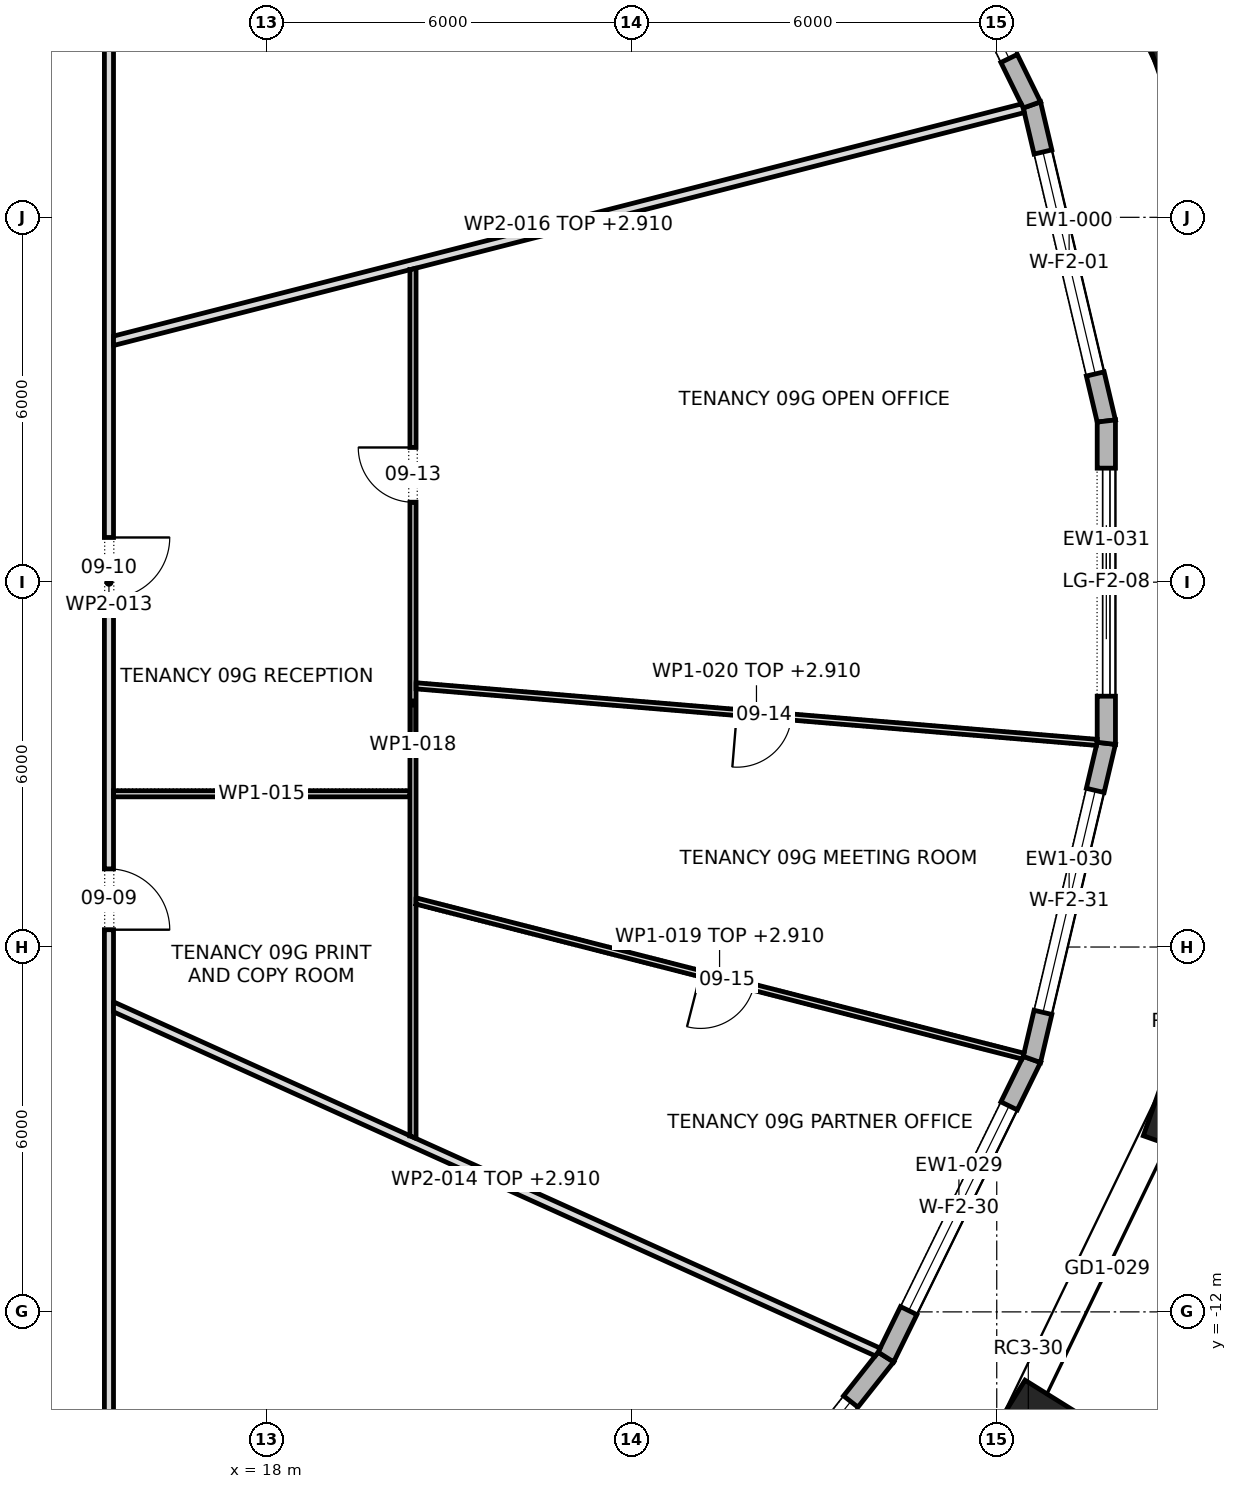
"""IFC4 building model, lengths in metres.
Left out: names, types, materials, properties, quantities, classifications, styles, units other than length and angle.
Written with IfcOpenShell. Run it as: python <this file> out.ifc"""

import sys

from ifc_helpers import new_model, si_unit, direction, frame, frame_2d, origin, origin_2d, place, context, subcontext, project, spatial, polyline, rectangle, outline, extrude, element, fill, save


model = new_model("IFC4")
c1 = context("Model", 3, precision=1e-05, world=origin(), true_north=direction((0.0, 1.0)))
c2 = subcontext(c1, "Body", "Model", "MODEL_VIEW")
j1 = project(units=[si_unit("LENGTHUNIT", "METRE"), si_unit("PLANEANGLEUNIT", "RADIAN")], contexts=[c1])
p1 = place(None, origin())
s1 = spatial("IfcSite", under=j1, at=p1, CompositionType="ELEMENT")
p2 = place(p1, origin())
s2 = spatial("IfcBuilding", under=s1, at=p2, CompositionType="ELEMENT")
p3 = place(p2, frame((0.0, 0.0, 129.7)))
s3 = spatial("IfcBuildingStorey", under=s2, at=p3, CompositionType="ELEMENT", Elevation=129.7)
for number, where, z_axis, x_axis in (
    (1, (33.115, 8.61, 0.0), (0.0, 0.0, 1.0), (-0.334, 0.943, 0.0)),
    (2, (30.519, -13.982, 0.0), (0.0, 0.0, 1.0), (0.529, 0.849, 0.0)),
    (3, (33.115, -8.61, 0.0), (0.0, 0.0, 1.0), (0.334, 0.943, 0.0)),
):
    element("IfcColumn", number, at=place(p3, frame(where, z_axis=z_axis, x_axis=x_axis)), inside=s3, PredefinedType="COLUMN", context=c2, shape_type="SweptSolid", body=[
        extrude(rectangle(XDim=1.4, YDim=1.0, at=origin_2d()), origin(), (0.0, 0.0, 1.0), 4.2),
    ])
p4 = place(p3, frame((31.802, 2.65, 0.0), z_axis=(0.0, 0.0, 1.0), x_axis=(-0.229227895667, 0.973372781543, 0.0)))
e4 = element("IfcWall", 4, at=p4, inside=s3, PredefinedType="STANDARD", context=c2, shape_type="SweptSolid", body=[
    extrude(outline(polyline([(-0.017, -0.15), (5.357, -0.15), (5.323, 0.15), (0.017, 0.15), (-0.017, -0.15)])), origin(), (0.0, 0.0, 1.0), 3.9),
])
p5 = place(p4, frame((0.795, 0.0, 0.6)))
e5 = element("IfcOpeningElement", 5, at=p5, cuts=e4, PredefinedType="OPENING", context=c2, shape_type="SweptSolid", body=[
    extrude(rectangle(XDim=3.75, YDim=2.85, at=frame_2d((1.875, 1.425))), frame((0.0, 0.162, 0.0), z_axis=(0.0, -1.0, 0.0), x_axis=(1.0, 0.0, 0.0)), (0.0, 0.0, 1.0), 0.324),
])
p6 = place(p3, frame((30.578, 7.848, 0.0), z_axis=(0.0, 0.0, 1.0), x_axis=(-0.440321465864, 0.897840189956, 0.0)))
e6 = element("IfcWall", 6, at=p6, inside=s3, PredefinedType="STANDARD", context=c2, shape_type="SweptSolid", body=[
    extrude(outline(polyline([(-0.017, -0.15), (5.468, -0.15), (5.435, 0.15), (0.017, 0.15), (-0.017, -0.15)])), origin(), (0.0, 0.0, 1.0), 3.9),
])
p7 = place(p6, frame((0.851, 0.0, 0.6)))
e7 = element("IfcOpeningElement", 7, at=p7, cuts=e6, PredefinedType="OPENING", context=c2, shape_type="SweptSolid", body=[
    extrude(rectangle(XDim=3.75, YDim=2.85, at=frame_2d((1.875, 1.425))), frame((0.0, 0.162, 0.0), z_axis=(0.0, -1.0, 0.0), x_axis=(1.0, 0.0, 0.0)), (0.0, 0.0, 1.0), 0.324),
])
p8 = place(p3, frame((24.694, -17.146, 0.0), z_axis=(0.0, 0.0, 1.0), x_axis=(0.620464552431, 0.784234492468, 0.0)))
e8 = element("IfcWall", 8, at=p8, inside=s3, PredefinedType="STANDARD", context=c2, shape_type="SweptSolid", body=[
    extrude(outline(polyline([(-0.015, -0.15), (5.63, -0.15), (5.598, 0.15), (0.015, 0.15), (-0.015, -0.15)])), origin(), (0.0, 0.0, 1.0), 3.9),
])
p9 = place(p8, frame((0.932, 0.0, 0.6)))
e9 = element("IfcOpeningElement", 9, at=p9, cuts=e8, PredefinedType="OPENING", context=c2, shape_type="SweptSolid", body=[
    extrude(rectangle(XDim=3.75, YDim=2.85, at=frame_2d((1.875, 1.425))), frame((0.0, 0.162, 0.0), z_axis=(0.0, -1.0, 0.0), x_axis=(1.0, 0.0, 0.0)), (0.0, 0.0, 1.0), 0.324),
])
p10 = place(p3, frame((28.177, -12.743, 0.0), z_axis=(0.0, 0.0, 1.0), x_axis=(0.440321465864, 0.897840189956, 0.0)))
e10 = element("IfcWall", 10, at=p10, inside=s3, PredefinedType="STANDARD", context=c2, shape_type="SweptSolid", body=[
    extrude(outline(polyline([(-0.016, -0.15), (5.468, -0.15), (5.435, 0.15), (0.016, 0.15), (-0.016, -0.15)])), origin(), (0.0, 0.0, 1.0), 3.9),
])
p11 = place(p10, frame((0.851, 0.0, 0.6)))
e11 = element("IfcOpeningElement", 11, at=p11, cuts=e10, PredefinedType="OPENING", context=c2, shape_type="SweptSolid", body=[
    extrude(rectangle(XDim=3.75, YDim=2.85, at=frame_2d((1.875, 1.425))), frame((0.0, 0.162, 0.0), z_axis=(0.0, -1.0, 0.0), x_axis=(1.0, 0.0, 0.0)), (0.0, 0.0, 1.0), 0.324),
])
p12 = place(p3, frame((30.578, -7.848, 0.0), z_axis=(0.0, 0.0, 1.0), x_axis=(0.229227895667, 0.973372781543, 0.0)))
e12 = element("IfcWall", 12, at=p12, inside=s3, PredefinedType="STANDARD", context=c2, shape_type="SweptSolid", body=[
    extrude(outline(polyline([(-0.017, -0.15), (5.357, -0.15), (5.323, 0.15), (0.017, 0.15), (-0.017, -0.15)])), origin(), (0.0, 0.0, 1.0), 3.9),
])
p13 = place(p12, frame((0.795, 0.0, 0.6)))
e13 = element("IfcOpeningElement", 13, at=p13, cuts=e12, PredefinedType="OPENING", context=c2, shape_type="SweptSolid", body=[
    extrude(rectangle(XDim=3.75, YDim=2.85, at=frame_2d((1.875, 1.425))), frame((0.0, 0.162, 0.0), z_axis=(0.0, -1.0, 0.0), x_axis=(1.0, 0.0, 0.0)), (0.0, 0.0, 1.0), 0.324),
])
p14 = place(p3, frame((31.802, -2.65, 0.0), z_axis=(0.0, 0.0, 1.0), x_axis=(0.0, 1.0, 0.0)))
e14 = element("IfcWall", 14, at=p14, inside=s3, PredefinedType="STANDARD", context=c2, shape_type="SweptSolid", body=[
    extrude(outline(polyline([(-0.017, -0.15), (5.318, -0.15), (5.283, 0.15), (0.017, 0.15), (-0.017, -0.15)])), origin(), (0.0, 0.0, 1.0), 3.9),
])
p15 = place(p14, frame((0.775, 0.0, 0.0)))
e15 = element("IfcOpeningElement", 15, at=p15, cuts=e14, PredefinedType="OPENING", context=c2, shape_type="SweptSolid", body=[
    extrude(rectangle(XDim=3.75, YDim=3.45, at=frame_2d((1.875, 1.725))), frame((0.0, 0.162, 0.0), z_axis=(0.0, -1.0, 0.0), x_axis=(1.0, 0.0, 0.0)), (0.0, 0.0, 1.0), 0.324),
])
p16 = place(p3, frame((15.4, -15.475, 0.0), z_axis=(0.0, 0.0, 1.0), x_axis=(0.0, 1.0, 0.0)))
e16 = element("IfcWall", 16, at=p16, inside=s3, PredefinedType="PARTITIONING", context=c2, shape_type="SweptSolid", body=[
    extrude(outline(polyline([(0.0, -0.075), (1.935, -0.075), (3.869, -0.075), (5.803, -0.075), (7.738, -0.075), (9.672, -0.075), (11.606, -0.075), (13.541, -0.075), (15.475, -0.075), (17.409, -0.075), (19.344, -0.075), (21.278, -0.075), (23.212, -0.075), (25.147, -0.075), (27.081, -0.075), (29.016, -0.075), (30.95, -0.075), (30.8, 0.075), (28.885, 0.075), (26.969, 0.075), (25.053, 0.075), (23.138, 0.075), (21.222, 0.075), (19.306, 0.075), (17.391, 0.075), (15.475, 0.075), (13.56, 0.075), (11.644, 0.075), (9.728, 0.075), (7.812, 0.075), (5.897, 0.075), (3.981, 0.075), (2.066, 0.075), (0.15, 0.075), (0.0, -0.075)])), origin(), (0.0, 0.0, 1.0), 3.9),
])
p17 = place(p16, frame((9.76, 0.0, 0.0)))
e17 = element("IfcOpeningElement", 17, at=p17, cuts=e16, PredefinedType="OPENING", context=c2, shape_type="SweptSolid", body=[
    extrude(rectangle(XDim=1.0, YDim=2.1, at=frame_2d((0.5, 1.05))), frame((0.0, 0.087, 0.0), z_axis=(0.0, -1.0, 0.0), x_axis=(1.0, 0.0, 0.0)), (0.0, 0.0, 1.0), 0.174),
])
p18 = place(p16, frame((15.21, 0.0, 0.0)))
e18 = element("IfcOpeningElement", 18, at=p18, cuts=e16, PredefinedType="OPENING", context=c2, shape_type="SweptSolid", body=[
    extrude(rectangle(XDim=1.0, YDim=2.1, at=frame_2d((0.5, 1.05))), frame((0.0, 0.087, 0.0), z_axis=(0.0, -1.0, 0.0), x_axis=(1.0, 0.0, 0.0)), (0.0, 0.0, 1.0), 0.174),
])
p19 = place(p16, frame((24.25, 0.0, 0.0)))
e19 = element("IfcOpeningElement", 19, at=p19, cuts=e16, PredefinedType="OPENING", context=c2, shape_type="SweptSolid", body=[
    extrude(rectangle(XDim=1.8, YDim=2.1, at=frame_2d((0.9, 1.05))), frame((0.0, 0.087, 0.0), z_axis=(0.0, -1.0, 0.0), x_axis=(1.0, 0.0, 0.0)), (0.0, 0.0, 1.0), 0.174),
])
p20 = place(p3, frame((15.444, -6.97, 0.0), z_axis=(0.0, 0.0, 1.0), x_axis=(0.911352660786, -0.411626441909, 0.0)))
e20 = element("IfcWall", 20, at=p20, inside=s3, PredefinedType="PARTITIONING", context=c2, shape_type="SweptSolid", body=[
    extrude(outline(polyline([(0.068, -0.075), (2.031, -0.075), (3.995, -0.075), (5.958, -0.075), (7.922, -0.075), (9.885, -0.075), (11.849, -0.075), (13.812, -0.075), (13.832, 0.001), (13.834, 0.074), (13.834, 0.075), (12.137, 0.075), (10.441, 0.075), (8.745, 0.075), (7.049, 0.075), (5.353, 0.075), (5.35, 0.074), (5.349, 0.075), (3.566, 0.075), (1.783, 0.075), (0.0, 0.075), (0.068, -0.075)])), origin(), (0.0, 0.0, 1.0), 2.91),
])
p21 = place(p3, frame((15.475, -3.48, 0.0), z_axis=(0.0, 0.0, 1.0), x_axis=(1.0, 0.0, 0.0)))
e21 = element("IfcWall", 21, at=p21, inside=s3, PredefinedType="PARTITIONING", context=c2, shape_type="SweptSolid", body=[
    extrude(rectangle(XDim=4.875, YDim=0.1, at=frame_2d((2.438, 0.0))), origin(), (0.0, 0.0, 1.0), 3.9),
])
p22 = place(p3, frame((15.457, 3.965, 0.0), z_axis=(0.0, 0.0, 1.0), x_axis=(0.968826155352, 0.247741560312, 0.0)))
e22 = element("IfcWall", 22, at=p22, inside=s3, PredefinedType="PARTITIONING", context=c2, shape_type="SweptSolid", body=[
    extrude(outline(polyline([(0.0, -0.075), (1.677, -0.075), (3.354, -0.075), (5.031, -0.075), (5.032, -0.073), (5.038, -0.075), (6.775, -0.075), (8.512, -0.075), (10.249, -0.075), (11.986, -0.075), (13.723, -0.075), (15.46, -0.075), (15.46, 0.01), (15.447, 0.075), (13.521, 0.075), (11.594, 0.075), (9.668, 0.075), (7.742, 0.075), (5.816, 0.075), (3.89, 0.075), (1.964, 0.075), (0.038, 0.075), (0.0, -0.073), (0.0, -0.075)])), origin(), (0.0, 0.0, 1.0), 2.91),
])
p23 = place(p3, frame((20.4, -9.148, 0.0), z_axis=(0.0, 0.0, 1.0), x_axis=(0.0, 1.0, 0.0)))
e23 = element("IfcWall", 23, at=p23, inside=s3, PredefinedType="PARTITIONING", context=c2, shape_type="SweptSolid", body=[
    extrude(outline(polyline([(0.0, -0.05), (1.927, -0.05), (3.854, -0.05), (3.854, -0.048), (3.861, -0.05), (5.603, -0.05), (7.345, -0.05), (9.087, -0.05), (10.828, -0.05), (12.57, -0.05), (14.312, -0.05), (14.312, -0.049), (14.287, 0.05), (12.573, 0.05), (10.859, 0.05), (9.146, 0.05), (7.432, 0.05), (5.719, 0.05), (5.719, 0.05), (5.618, 0.05), (5.618, 0.05), (3.761, 0.05), (1.903, 0.05), (0.045, 0.05), (0.0, -0.05), (0.0, -0.05)])), origin(), (0.0, 0.0, 1.0), 3.9),
])
p24 = place(p23, frame((10.463, 0.0, 0.0)))
e24 = element("IfcOpeningElement", 24, at=p24, cuts=e23, PredefinedType="OPENING", context=c2, shape_type="SweptSolid", body=[
    extrude(rectangle(XDim=0.9, YDim=2.1, at=frame_2d((0.45, 1.05))), frame((0.0, 0.062, 0.0), z_axis=(0.0, -1.0, 0.0), x_axis=(1.0, 0.0, 0.0)), (0.0, 0.0, 1.0), 0.124),
])
p25 = place(p3, frame((20.438, -5.24, 0.0), z_axis=(0.0, 0.0, 1.0), x_axis=(0.968862785912, -0.247598267511, 0.0)))
e25 = element("IfcWall", 25, at=p25, inside=s3, PredefinedType="PARTITIONING", context=c2, shape_type="SweptSolid", body=[
    extrude(outline(polyline([(0.025, -0.05), (1.74, -0.05), (3.454, -0.05), (5.168, -0.05), (6.882, -0.05), (8.596, -0.05), (10.31, -0.05), (10.319, -0.008), (10.319, 0.05), (8.599, 0.05), (6.879, 0.05), (5.159, 0.05), (3.44, 0.05), (1.72, 0.05), (0.0, 0.05), (0.0, 0.05), (0.025, -0.05)])), origin(), (0.0, 0.0, 1.0), 2.91),
])
p26 = place(p25, frame((4.842, 0.0, 0.0)))
e26 = element("IfcOpeningElement", 26, at=p26, cuts=e25, PredefinedType="OPENING", context=c2, shape_type="SweptSolid", body=[
    extrude(rectangle(XDim=0.9, YDim=2.1, at=frame_2d((0.45, 1.05))), frame((0.0, 0.062, 0.0), z_axis=(0.0, -1.0, 0.0), x_axis=(1.0, 0.0, 0.0)), (0.0, 0.0, 1.0), 0.124),
])
p27 = place(p3, frame((20.446, -1.704, 0.0), z_axis=(0.0, 0.0, 1.0), x_axis=(0.996562664629, -0.082842353107, 0.0)))
e27 = element("IfcWall", 27, at=p27, inside=s3, PredefinedType="PARTITIONING", context=c2, shape_type="SweptSolid", body=[
    extrude(outline(polyline([(0.008, -0.05), (1.879, -0.05), (3.751, -0.05), (5.622, -0.05), (7.494, -0.05), (9.365, -0.05), (11.236, -0.05), (11.24, -0.026), (11.24, 0.05), (9.367, 0.05), (7.493, 0.05), (5.62, 0.05), (3.747, 0.05), (1.873, 0.05), (0.0, 0.05), (0.0, 0.045), (0.008, -0.05)])), origin(), (0.0, 0.0, 1.0), 2.91),
])
p28 = place(p27, frame((5.298, 0.0, 0.0)))
e28 = element("IfcOpeningElement", 28, at=p28, cuts=e27, PredefinedType="OPENING", context=c2, shape_type="SweptSolid", body=[
    extrude(rectangle(XDim=0.9, YDim=2.1, at=frame_2d((0.45, 1.05))), frame((0.0, 0.062, 0.0), z_axis=(0.0, -1.0, 0.0), x_axis=(1.0, 0.0, 0.0)), (0.0, 0.0, 1.0), 0.124),
])
p29 = place(p5, origin())
e29 = element("IfcWindow", 29, at=p29, inside=s3, PartitioningType="TRIPLE_PANEL_VERTICAL", PredefinedType="WINDOW", context=c2, shape_type="SweptSolid", body=[
    extrude(rectangle(XDim=3.75, YDim=2.85, at=frame_2d((1.875, 1.425))), frame((0.0, 0.03, 0.0), z_axis=(0.0, -1.0, 0.0), x_axis=(1.0, 0.0, 0.0)), (0.0, 0.0, 1.0), 0.06),
])
fill(e5, e29)
p30 = place(p7, origin())
e30 = element("IfcWindow", 30, at=p30, inside=s3, PartitioningType="TRIPLE_PANEL_VERTICAL", PredefinedType="WINDOW", context=c2, shape_type="SweptSolid", body=[
    extrude(rectangle(XDim=3.75, YDim=2.85, at=frame_2d((1.875, 1.425))), frame((0.0, 0.03, 0.0), z_axis=(0.0, -1.0, 0.0), x_axis=(1.0, 0.0, 0.0)), (0.0, 0.0, 1.0), 0.06),
])
fill(e7, e30)
p31 = place(p9, origin())
e31 = element("IfcWindow", 31, at=p31, inside=s3, PartitioningType="TRIPLE_PANEL_VERTICAL", PredefinedType="WINDOW", context=c2, shape_type="SweptSolid", body=[
    extrude(rectangle(XDim=3.75, YDim=2.85, at=frame_2d((1.875, 1.425))), frame((0.0, 0.03, 0.0), z_axis=(0.0, -1.0, 0.0), x_axis=(1.0, 0.0, 0.0)), (0.0, 0.0, 1.0), 0.06),
])
fill(e9, e31)
p32 = place(p11, origin())
e32 = element("IfcWindow", 32, at=p32, inside=s3, PartitioningType="TRIPLE_PANEL_VERTICAL", PredefinedType="WINDOW", context=c2, shape_type="SweptSolid", body=[
    extrude(rectangle(XDim=3.75, YDim=2.85, at=frame_2d((1.875, 1.425))), frame((0.0, 0.03, 0.0), z_axis=(0.0, -1.0, 0.0), x_axis=(1.0, 0.0, 0.0)), (0.0, 0.0, 1.0), 0.06),
])
fill(e11, e32)
p33 = place(p13, origin())
e33 = element("IfcWindow", 33, at=p33, inside=s3, PartitioningType="TRIPLE_PANEL_VERTICAL", PredefinedType="WINDOW", context=c2, shape_type="SweptSolid", body=[
    extrude(rectangle(XDim=3.75, YDim=2.85, at=frame_2d((1.875, 1.425))), frame((0.0, 0.03, 0.0), z_axis=(0.0, -1.0, 0.0), x_axis=(1.0, 0.0, 0.0)), (0.0, 0.0, 1.0), 0.06),
])
fill(e13, e33)
p34 = place(p15, origin())
e34 = element("IfcDoor", 34, at=p34, inside=s3, OperationType="DOUBLE_DOOR_SLIDING", PredefinedType="DOOR", context=c2, shape_type="SweptSolid", body=[
    extrude(rectangle(XDim=3.75, YDim=3.45, at=frame_2d((1.875, 1.725))), frame((0.0, 0.025, 0.0), z_axis=(0.0, -1.0, 0.0), x_axis=(1.0, 0.0, 0.0)), (0.0, 0.0, 1.0), 0.05),
])
fill(e15, e34)
p35 = place(p17, frame((1.0, 0.0, 0.0), z_axis=(0.0, 0.0, 1.0), x_axis=(-1.0, 0.0, 0.0)))
e35 = element("IfcDoor", 35, at=p35, inside=s3, OperationType="SINGLE_SWING_LEFT", PredefinedType="DOOR", context=c2, shape_type="SweptSolid", body=[
    extrude(rectangle(XDim=1.0, YDim=2.1, at=frame_2d((0.5, 1.05))), frame((0.0, 0.025, 0.0), z_axis=(0.0, -1.0, 0.0), x_axis=(1.0, 0.0, 0.0)), (0.0, 0.0, 1.0), 0.05),
])
fill(e17, e35)
p36 = place(p18, frame((1.0, 0.0, 0.0), z_axis=(0.0, 0.0, 1.0), x_axis=(-1.0, 0.0, 0.0)))
e36 = element("IfcDoor", 36, at=p36, inside=s3, OperationType="SINGLE_SWING_RIGHT", PredefinedType="DOOR", context=c2, shape_type="SweptSolid", body=[
    extrude(rectangle(XDim=1.0, YDim=2.1, at=frame_2d((0.5, 1.05))), frame((0.0, 0.025, 0.0), z_axis=(0.0, -1.0, 0.0), x_axis=(1.0, 0.0, 0.0)), (0.0, 0.0, 1.0), 0.05),
])
fill(e18, e36)
p37 = place(p24, origin())
e37 = element("IfcDoor", 37, at=p37, inside=s3, OperationType="SINGLE_SWING_LEFT", PredefinedType="DOOR", context=c2, shape_type="SweptSolid", body=[
    extrude(rectangle(XDim=0.9, YDim=2.1, at=frame_2d((0.45, 1.05))), frame((0.0, 0.025, 0.0), z_axis=(0.0, -1.0, 0.0), x_axis=(1.0, 0.0, 0.0)), (0.0, 0.0, 1.0), 0.05),
])
fill(e24, e37)
p38 = place(p28, frame((0.9, 0.0, 0.0), z_axis=(0.0, 0.0, 1.0), x_axis=(-1.0, 0.0, 0.0)))
e38 = element("IfcDoor", 38, at=p38, inside=s3, OperationType="SINGLE_SWING_LEFT", PredefinedType="DOOR", context=c2, shape_type="SweptSolid", body=[
    extrude(rectangle(XDim=0.9, YDim=2.1, at=frame_2d((0.45, 1.05))), frame((0.0, 0.025, 0.0), z_axis=(0.0, -1.0, 0.0), x_axis=(1.0, 0.0, 0.0)), (0.0, 0.0, 1.0), 0.05),
])
fill(e28, e38)
p39 = place(p26, frame((0.9, 0.0, 0.0), z_axis=(0.0, 0.0, 1.0), x_axis=(-1.0, 0.0, 0.0)))
e39 = element("IfcDoor", 39, at=p39, inside=s3, OperationType="SINGLE_SWING_LEFT", PredefinedType="DOOR", context=c2, shape_type="SweptSolid", body=[
    extrude(rectangle(XDim=0.9, YDim=2.1, at=frame_2d((0.45, 1.05))), frame((0.0, 0.025, 0.0), z_axis=(0.0, -1.0, 0.0), x_axis=(1.0, 0.0, 0.0)), (0.0, 0.0, 1.0), 0.05),
])
fill(e26, e39)
save(model, sys.argv[1])
